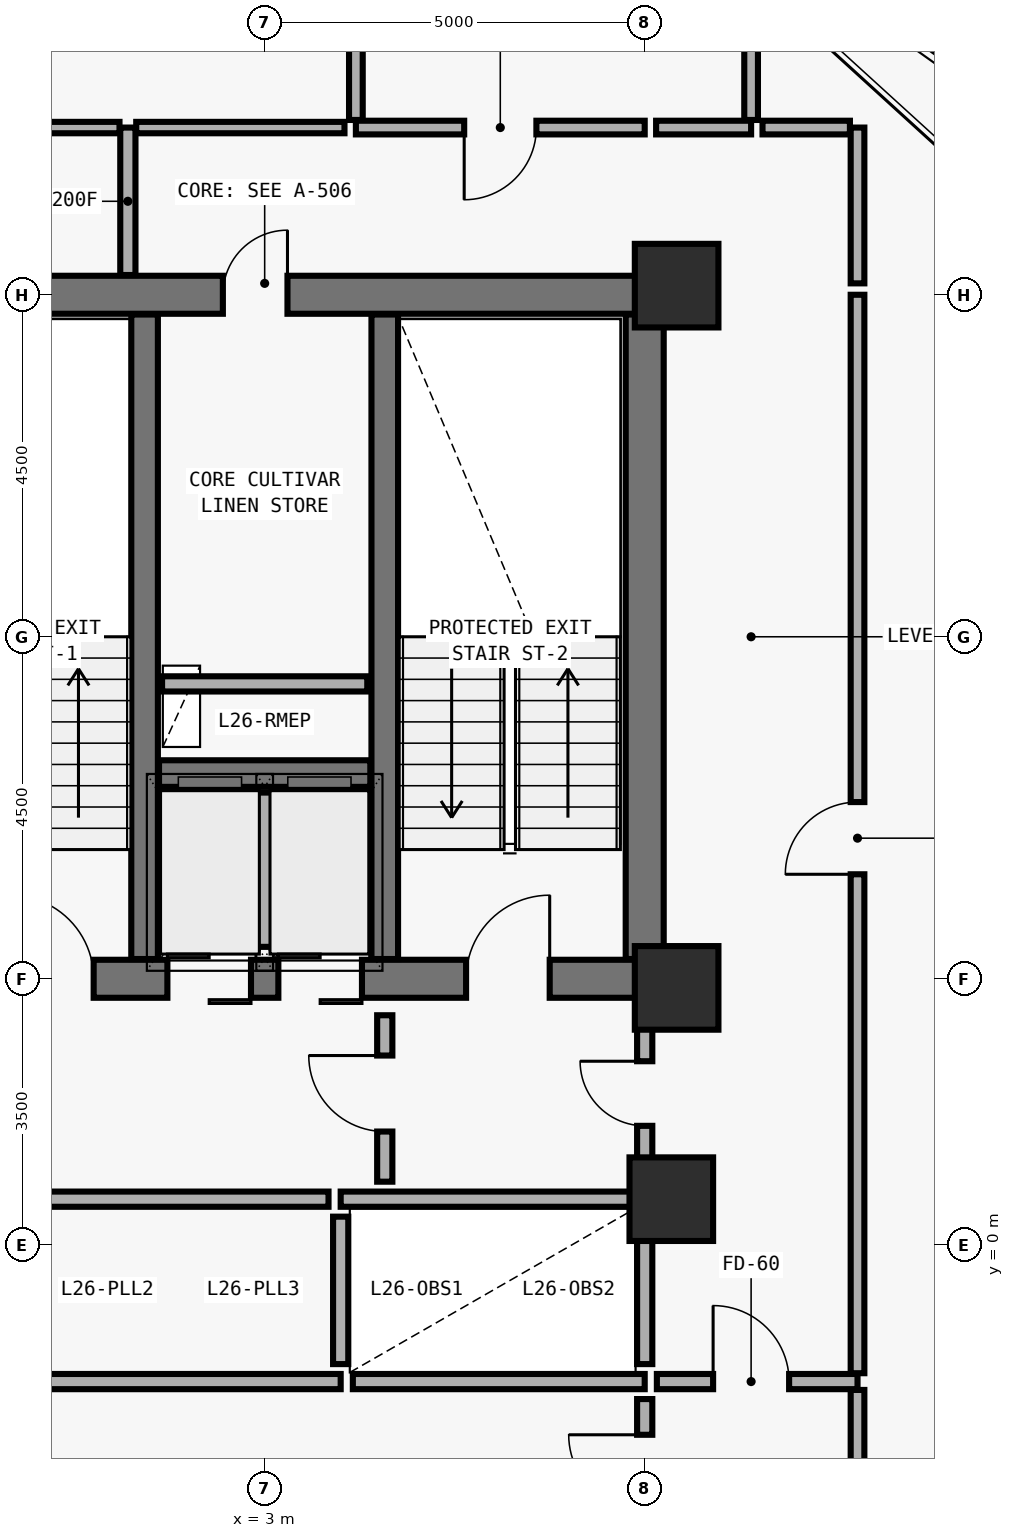
"""IFC4 building model, lengths in metres.
Left out: names, types, materials, properties, quantities, classifications, styles, units other than length and angle.
Written with IfcOpenShell. Run it as: python <this file> out.ifc"""

import sys

from ifc_helpers import new_model, si_unit, direction, frame, frame_2d, origin, origin_2d, place, context, subcontext, project, spatial, rectangle, extrude, element, fill, save


model = new_model("IFC4")
c1 = context("Model", 3, precision=1e-05, world=origin(), true_north=direction((0.0, 1.0)))
c2 = subcontext(c1, "Body", "Model", "MODEL_VIEW")
j1 = project(units=[si_unit("LENGTHUNIT", "METRE"), si_unit("PLANEANGLEUNIT", "RADIAN")], contexts=[c1])
p1 = place(None, origin())
s1 = spatial("IfcSite", under=j1, at=p1, CompositionType="ELEMENT")
p2 = place(p1, origin())
s2 = spatial("IfcBuilding", under=s1, at=p2, CompositionType="ELEMENT")
p3 = place(p2, frame((0.0, 0.0, 107.1)))
s3 = spatial("IfcBuildingStorey", under=s2, at=p3, CompositionType="ELEMENT", Elevation=107.1)
p4 = place(p3, frame((-2.0, 3.5, 0.0), z_axis=(0.0, 0.0, 1.0), x_axis=(1.0, 0.0, 0.0)))
e1 = element("IfcWall", 1, at=p4, inside=s3, PredefinedType="SHEAR", context=c2, shape_type="SweptSolid", body=[
    extrude(rectangle(XDim=10.0, YDim=0.5, at=frame_2d((5.0, 0.0))), origin(), (0.0, 0.0, 1.0), 3.892),
])
p5 = place(p4, frame((1.65, 0.0, 0.0)))
e2 = element("IfcOpeningElement", 2, at=p5, cuts=e1, PredefinedType="OPENING", context=c2, shape_type="SweptSolid", body=[
    extrude(rectangle(XDim=1.1, YDim=2.15, at=frame_2d((0.55, 1.075))), frame((0.0, 0.26, 0.0), z_axis=(0.0, -1.0, 0.0), x_axis=(1.0, 0.0, 0.0)), (0.0, 0.0, 1.0), 0.52),
])
p6 = place(p4, frame((7.65, 0.0, 0.0)))
e3 = element("IfcOpeningElement", 3, at=p6, cuts=e1, PredefinedType="OPENING", context=c2, shape_type="SweptSolid", body=[
    extrude(rectangle(XDim=1.1, YDim=2.15, at=frame_2d((0.55, 1.075))), frame((0.0, 0.26, 0.0), z_axis=(0.0, -1.0, 0.0), x_axis=(1.0, 0.0, 0.0)), (0.0, 0.0, 1.0), 0.52),
])
p7 = place(p4, frame((3.72, 0.0, 0.0)))
e4 = element("IfcOpeningElement", 4, at=p7, cuts=e1, PredefinedType="OPENING", context=c2, shape_type="SweptSolid", body=[
    extrude(rectangle(XDim=1.1, YDim=2.2, at=frame_2d((0.55, 1.1))), frame((0.0, 0.26, 0.0), z_axis=(0.0, -1.0, 0.0), x_axis=(1.0, 0.0, 0.0)), (0.0, 0.0, 1.0), 0.52),
])
p8 = place(p4, frame((5.18, 0.0, 0.0)))
e5 = element("IfcOpeningElement", 5, at=p8, cuts=e1, PredefinedType="OPENING", context=c2, shape_type="SweptSolid", body=[
    extrude(rectangle(XDim=1.1, YDim=2.2, at=frame_2d((0.55, 1.1))), frame((0.0, 0.26, 0.0), z_axis=(0.0, -1.0, 0.0), x_axis=(1.0, 0.0, 0.0)), (0.0, 0.0, 1.0), 0.52),
])
p9 = place(p3, frame((-2.0, 12.5, 0.0), z_axis=(0.0, 0.0, 1.0), x_axis=(1.0, 0.0, 0.0)))
e6 = element("IfcWall", 6, at=p9, inside=s3, PredefinedType="SHEAR", context=c2, shape_type="SweptSolid", body=[
    extrude(rectangle(XDim=10.0, YDim=0.5, at=frame_2d((5.0, 0.0))), origin(), (0.0, 0.0, 1.0), 3.892),
])
p10 = place(p9, frame((4.45, 0.0, 0.0)))
e7 = element("IfcOpeningElement", 7, at=p10, cuts=e6, PredefinedType="OPENING", context=c2, shape_type="SweptSolid", body=[
    extrude(rectangle(XDim=0.85, YDim=2.1, at=frame_2d((0.425, 1.05))), frame((0.0, 0.26, 0.0), z_axis=(0.0, -1.0, 0.0), x_axis=(1.0, 0.0, 0.0)), (0.0, 0.0, 1.0), 0.52),
])
p11 = place(p3, frame((8.0, 3.76, 0.0), z_axis=(0.0, 0.0, 1.0), x_axis=(0.0, 1.0, 0.0)))
e8 = element("IfcWall", 8, at=p11, inside=s3, PredefinedType="SHEAR", context=c2, shape_type="SweptSolid", body=[
    extrude(rectangle(XDim=8.48, YDim=0.5, at=frame_2d((4.24, 0.0))), origin(), (0.0, 0.0, 1.0), 3.892),
])
for number, where, z_axis, x_axis in (
    (9, (1.42, 3.76, 0.0), (0.0, 0.0, 1.0), (0.0, 1.0, 0.0)),
    (10, (4.58, 3.76, 0.0), (0.0, 0.0, 1.0), (0.0, 1.0, 0.0)),
):
    element("IfcWall", number, at=place(p3, frame(where, z_axis=z_axis, x_axis=x_axis)), inside=s3, PredefinedType="SHEAR", context=c2, shape_type="SweptSolid", body=[
        extrude(rectangle(XDim=8.48, YDim=0.35, at=frame_2d((4.24, 0.0))), origin(), (0.0, 0.0, 1.0), 3.892),
    ])
p12 = place(p3, frame((1.61, 6.2, 0.0), z_axis=(0.0, 0.0, 1.0), x_axis=(1.0, 0.0, 0.0)))
e11 = element("IfcWall", 11, at=p12, inside=s3, PredefinedType="SHEAR", context=c2, shape_type="SweptSolid", body=[
    extrude(rectangle(XDim=2.78, YDim=0.35, at=frame_2d((1.39, 0.0))), origin(), (0.0, 0.0, 1.0), 3.892),
])
for number, where, z_axis, x_axis in (
    (12, (8.42, 12.62, 0.0), (0.0, 0.0, 1.0), (1.0, 0.0, 0.0)),
    (13, (8.42, 3.38, 0.0), (0.0, 0.0, 1.0), (1.0, 0.0, 0.0)),
    (14, (8.35, 0.6, 0.0), (0.0, 0.0, 1.0), (1.0, 0.0, 0.0)),
):
    element("IfcColumn", number, at=place(p3, frame(where, z_axis=z_axis, x_axis=x_axis)), inside=s3, PredefinedType="COLUMN", context=c2, shape_type="SweptSolid", body=[
        extrude(rectangle(XDim=1.1, YDim=1.1, at=origin_2d()), origin(), (0.0, 0.0, 1.0), 3.875),
    ])
p13 = place(p3, frame((3.0, 3.92, 0.0), z_axis=(0.0, 0.0, 1.0), x_axis=(0.0, 1.0, 0.0)))
e15 = element("IfcWall", 15, at=p13, inside=s3, PredefinedType="SOLIDWALL", context=c2, shape_type="SweptSolid", body=[
    extrude(rectangle(XDim=2.03, YDim=0.2, at=frame_2d((1.015, 0.0))), origin(), (0.0, 0.0, 1.0), 3.64),
])
p14 = place(p3, frame((1.65, 7.38, 0.0), z_axis=(0.0, 0.0, 1.0), x_axis=(1.0, 0.0, 0.0)))
e16 = element("IfcWall", 16, at=p14, inside=s3, PredefinedType="SOLIDWALL", context=c2, shape_type="SweptSolid", body=[
    extrude(rectangle(XDim=2.7, YDim=0.2, at=frame_2d((1.35, 0.0))), origin(), (0.0, 0.0, 1.0), 3.64),
])
p15 = place(p3, frame((4.0, 0.6, 0.0), z_axis=(0.0, 0.0, 1.0), x_axis=(1.0, 0.0, 0.0)))
e17 = element("IfcWall", 17, at=p15, inside=s3, PredefinedType="SOLIDWALL", context=c2, shape_type="SweptSolid", body=[
    extrude(rectangle(XDim=3.88, YDim=0.2, at=frame_2d((1.94, 0.0))), origin(), (0.0, 0.0, 1.0), 3.172),
])
p16 = place(p3, frame((-2.0, -1.8, 0.0), z_axis=(0.0, 0.0, 1.0), x_axis=(1.0, 0.0, 0.0)))
e18 = element("IfcWall", 18, at=p16, inside=s3, PredefinedType="SOLIDWALL", context=c2, shape_type="SweptSolid", body=[
    extrude(rectangle(XDim=6.0, YDim=0.2, at=frame_2d((3.0, 0.0))), origin(), (0.0, 0.0, 1.0), 3.64),
])
p17 = place(p3, frame((4.16, -1.8, 0.0), z_axis=(0.0, 0.0, 1.0), x_axis=(1.0, 0.0, 0.0)))
e19 = element("IfcWall", 19, at=p17, inside=s3, PredefinedType="SOLIDWALL", context=c2, shape_type="SweptSolid", body=[
    extrude(rectangle(XDim=3.84, YDim=0.2, at=frame_2d((1.92, 0.0))), origin(), (0.0, 0.0, 1.0), 3.64),
])
p18 = place(p3, frame((4.0, -1.57, 0.0), z_axis=(0.0, 0.0, 1.0), x_axis=(0.0, 1.0, 0.0)))
e20 = element("IfcWall", 20, at=p18, inside=s3, PredefinedType="SOLIDWALL", context=c2, shape_type="SweptSolid", body=[
    extrude(rectangle(XDim=1.94, YDim=0.2, at=frame_2d((0.97, 0.0))), origin(), (0.0, 0.0, 1.0), 3.64),
])
p19 = place(p3, frame((8.0, -1.57, 0.0), z_axis=(0.0, 0.0, 1.0), x_axis=(0.0, 1.0, 0.0)))
e21 = element("IfcWall", 21, at=p19, inside=s3, PredefinedType="SOLIDWALL", context=c2, shape_type="SweptSolid", body=[
    extrude(rectangle(XDim=2.05, YDim=0.2, at=frame_2d((1.025, 0.0))), origin(), (0.0, 0.0, 1.0), 3.072),
])
p20 = place(p3, frame((4.58, 0.83, 0.0), z_axis=(0.0, 0.0, 1.0), x_axis=(0.0, 1.0, 0.0)))
e22 = element("IfcWall", 22, at=p20, inside=s3, PredefinedType="MOVABLE", context=c2, shape_type="SweptSolid", body=[
    extrude(rectangle(XDim=2.19, YDim=0.2, at=frame_2d((1.095, 0.0))), origin(), (0.0, 0.0, 1.0), 3.64),
])
p21 = place(p20, frame((0.66, 0.0, 0.0)))
e23 = element("IfcOpeningElement", 23, at=p21, cuts=e22, PredefinedType="OPENING", context=c2, shape_type="SweptSolid", body=[
    extrude(rectangle(XDim=1.0, YDim=2.1, at=frame_2d((0.5, 1.05))), frame((0.0, 0.11, 0.0), z_axis=(0.0, -1.0, 0.0), x_axis=(1.0, 0.0, 0.0)), (0.0, 0.0, 1.0), 0.22),
])
p22 = place(p3, frame((8.0, 0.72, 0.0), z_axis=(0.0, 0.0, 1.0), x_axis=(0.0, 1.0, 0.0)))
e24 = element("IfcWall", 24, at=p22, inside=s3, PredefinedType="MOVABLE", context=c2, shape_type="SweptSolid", body=[
    extrude(rectangle(XDim=2.3, YDim=0.2, at=frame_2d((1.15, 0.0))), origin(), (0.0, 0.0, 1.0), 2.872),
])
p23 = place(p22, frame((0.845, 0.0, 0.0)))
e25 = element("IfcOpeningElement", 25, at=p23, cuts=e24, PredefinedType="OPENING", context=c2, shape_type="SweptSolid", body=[
    extrude(rectangle(XDim=0.85, YDim=2.1, at=frame_2d((0.425, 1.05))), frame((0.0, 0.11, 0.0), z_axis=(0.0, -1.0, 0.0), x_axis=(1.0, 0.0, 0.0)), (0.0, 0.0, 1.0), 0.22),
])
p24 = place(p3, frame((8.0, -3.97, 0.0), z_axis=(0.0, 0.0, 1.0), x_axis=(0.0, 1.0, 0.0)))
e26 = element("IfcWall", 26, at=p24, inside=s3, PredefinedType="MOVABLE", context=c2, shape_type="SweptSolid", body=[
    extrude(rectangle(XDim=1.94, YDim=0.2, at=frame_2d((0.97, 0.0))), origin(), (0.0, 0.0, 1.0), 3.072),
])
p25 = place(p24, frame((0.47, 0.0, 0.0)))
e27 = element("IfcOpeningElement", 27, at=p25, cuts=e26, PredefinedType="OPENING", context=c2, shape_type="SweptSolid", body=[
    extrude(rectangle(XDim=1.0, YDim=2.1, at=frame_2d((0.5, 1.05))), frame((0.0, 0.11, 0.0), z_axis=(0.0, -1.0, 0.0), x_axis=(1.0, 0.0, 0.0)), (0.0, 0.0, 1.0), 0.22),
])
p26 = place(p3, frame((8.16, -1.8, 0.0), z_axis=(0.0, 0.0, 1.0), x_axis=(1.0, 0.0, 0.0)))
e28 = element("IfcWall", 28, at=p26, inside=s3, PredefinedType="MOVABLE", context=c2, shape_type="SweptSolid", body=[
    extrude(rectangle(XDim=2.64, YDim=0.2, at=frame_2d((1.32, 0.0))), origin(), (0.0, 0.0, 1.0), 3.64),
])
p27 = place(p26, frame((0.74, 0.0, 0.0)))
e29 = element("IfcOpeningElement", 29, at=p27, cuts=e28, PredefinedType="OPENING", context=c2, shape_type="SweptSolid", body=[
    extrude(rectangle(XDim=1.0, YDim=2.1, at=frame_2d((0.5, 1.05))), frame((0.0, 0.11, 0.0), z_axis=(0.0, -1.0, 0.0), x_axis=(1.0, 0.0, 0.0)), (0.0, 0.0, 1.0), 0.22),
])
p28 = place(p3, frame((8.0, 14.7, 0.0), z_axis=(0.0, 0.0, 1.0), x_axis=(-1.0, 0.0, 0.0)))
e30 = element("IfcWall", 30, at=p28, inside=s3, PredefinedType="PLUMBINGWALL", context=c2, shape_type="SweptSolid", body=[
    extrude(rectangle(XDim=3.8, YDim=0.18, at=frame_2d((1.9, 0.0))), origin(), (0.0, 0.0, 1.0), 3.172),
])
p29 = place(p28, frame((1.425, 0.0, 0.0)))
e31 = element("IfcOpeningElement", 31, at=p29, cuts=e30, PredefinedType="OPENING", context=c2, shape_type="SweptSolid", body=[
    extrude(rectangle(XDim=0.95, YDim=2.1, at=frame_2d((0.475, 1.05))), frame((0.0, 0.1, 0.0), z_axis=(0.0, -1.0, 0.0), x_axis=(1.0, 0.0, 0.0)), (0.0, 0.0, 1.0), 0.2),
])
p30 = place(p3, frame((10.8, -1.69, 0.0), z_axis=(0.0, 0.0, 1.0), x_axis=(0.0, 1.0, 0.0)))
e32 = element("IfcWall", 32, at=p30, inside=s3, PredefinedType="PLUMBINGWALL", context=c2, shape_type="SweptSolid", body=[
    extrude(rectangle(XDim=14.19, YDim=0.18, at=frame_2d((7.095, 0.0))), origin(), (0.0, 0.0, 1.0), 3.64),
])
p31 = place(p30, frame((6.565, 0.0, 0.0)))
e33 = element("IfcOpeningElement", 33, at=p31, cuts=e32, PredefinedType="OPENING", context=c2, shape_type="SweptSolid", body=[
    extrude(rectangle(XDim=0.95, YDim=2.1, at=frame_2d((0.475, 1.05))), frame((0.0, 0.1, 0.0), z_axis=(0.0, -1.0, 0.0), x_axis=(1.0, 0.0, 0.0)), (0.0, 0.0, 1.0), 0.2),
])
p32 = place(p3, frame((-1.88, 0.6, 0.0), z_axis=(0.0, 0.0, 1.0), x_axis=(1.0, 0.0, 0.0)))
e34 = element("IfcWall", 34, at=p32, inside=s3, PredefinedType="MOVABLE", context=c2, shape_type="SweptSolid", body=[
    extrude(rectangle(XDim=5.72, YDim=0.2, at=frame_2d((2.86, 0.0))), origin(), (0.0, 0.0, 1.0), 3.172),
])
p33 = place(p3, frame((1.2, 14.7, 0.0), z_axis=(0.0, 0.0, 1.0), x_axis=(0.0, -1.0, 0.0)))
e35 = element("IfcWall", 35, at=p33, inside=s3, PredefinedType="MOVABLE", context=c2, shape_type="SweptSolid", body=[
    extrude(rectangle(XDim=1.94, YDim=0.2, at=frame_2d((0.97, 0.0))), origin(), (0.0, 0.0, 1.0), 3.64),
])
p34 = place(p3, frame((9.4, 14.7, 0.0), z_axis=(0.0, 0.0, 1.0), x_axis=(-1.0, 0.0, 0.0)))
e36 = element("IfcWall", 36, at=p34, inside=s3, PredefinedType="PLUMBINGWALL", context=c2, shape_type="SweptSolid", body=[
    extrude(rectangle(XDim=1.25, YDim=0.18, at=frame_2d((0.625, 0.0))), origin(), (0.0, 0.0, 1.0), 3.172),
])
p35 = place(p3, frame((1.09, 14.7, 0.0), z_axis=(0.0, 0.0, 1.0), x_axis=(-1.0, 0.0, 0.0)))
e37 = element("IfcWall", 37, at=p35, inside=s3, PredefinedType="PARTITIONING", context=c2, shape_type="SweptSolid", body=[
    extrude(rectangle(XDim=3.09, YDim=0.15, at=frame_2d((1.545, 0.0))), origin(), (0.0, 0.0, 1.0), 3.64),
])
p36 = place(p3, frame((4.05, 14.7, 0.0), z_axis=(0.0, 0.0, 1.0), x_axis=(-1.0, 0.0, 0.0)))
e38 = element("IfcWall", 38, at=p36, inside=s3, PredefinedType="PARTITIONING", context=c2, shape_type="SweptSolid", body=[
    extrude(rectangle(XDim=2.74, YDim=0.15, at=frame_2d((1.37, 0.0))), origin(), (0.0, 0.0, 1.0), 3.172),
])
p37 = place(p3, frame((4.2, 19.175, 0.0), z_axis=(0.0, 0.0, 1.0), x_axis=(0.0, -1.0, 0.0)))
e39 = element("IfcWall", 39, at=p37, inside=s3, PredefinedType="PLUMBINGWALL", context=c2, shape_type="SweptSolid", body=[
    extrude(rectangle(XDim=4.375, YDim=0.18, at=frame_2d((2.188, 0.0))), origin(), (0.0, 0.0, 1.0), 3.64),
])
p38 = place(p3, frame((10.8, 12.65, 0.0), z_axis=(0.0, 0.0, 1.0), x_axis=(0.0, 1.0, 0.0)))
e40 = element("IfcWall", 40, at=p38, inside=s3, PredefinedType="PLUMBINGWALL", context=c2, shape_type="SweptSolid", body=[
    extrude(rectangle(XDim=2.05, YDim=0.18, at=frame_2d((1.025, 0.0))), origin(), (0.0, 0.0, 1.0), 3.64),
])
p39 = place(p3, frame((10.7, 14.7, 0.0), z_axis=(0.0, 0.0, 1.0), x_axis=(-1.0, 0.0, 0.0)))
e41 = element("IfcWall", 41, at=p39, inside=s3, PredefinedType="PLUMBINGWALL", context=c2, shape_type="SweptSolid", body=[
    extrude(rectangle(XDim=1.15, YDim=0.18, at=frame_2d((0.575, 0.0))), origin(), (0.0, 0.0, 1.0), 3.64),
])
p40 = place(p3, frame((10.8, -6.45, 0.0), z_axis=(0.0, 0.0, 1.0), x_axis=(0.0, 1.0, 0.0)))
e42 = element("IfcWall", 42, at=p40, inside=s3, PredefinedType="PLUMBINGWALL", context=c2, shape_type="SweptSolid", body=[
    extrude(rectangle(XDim=4.54, YDim=0.18, at=frame_2d((2.27, 0.0))), origin(), (0.0, 0.0, 1.0), 3.64),
])
p41 = place(p3, frame((9.4, 14.8, 0.0), z_axis=(0.0, 0.0, 1.0), x_axis=(0.0, 1.0, 0.0)))
e43 = element("IfcWall", 43, at=p41, inside=s3, PredefinedType="PLUMBINGWALL", context=c2, shape_type="SweptSolid", body=[
    extrude(rectangle(XDim=2.298, YDim=0.18, at=frame_2d((1.149, 0.0))), origin(), (0.0, 0.0, 1.0), 3.022),
])
p42 = place(p5, origin())
e44 = element("IfcDoor", 44, at=p42, inside=s3, OperationType="SINGLE_SWING_LEFT", PredefinedType="DOOR", context=c2, shape_type="SweptSolid", body=[
    extrude(rectangle(XDim=1.1, YDim=2.15, at=frame_2d((0.55, 1.075))), frame((0.0, 0.025, 0.0), z_axis=(0.0, -1.0, 0.0), x_axis=(1.0, 0.0, 0.0)), (0.0, 0.0, 1.0), 0.05),
])
fill(e2, e44)
p43 = place(p6, origin())
e45 = element("IfcDoor", 45, at=p43, inside=s3, OperationType="SINGLE_SWING_RIGHT", PredefinedType="DOOR", context=c2, shape_type="SweptSolid", body=[
    extrude(rectangle(XDim=1.1, YDim=2.15, at=frame_2d((0.55, 1.075))), frame((0.0, 0.025, 0.0), z_axis=(0.0, -1.0, 0.0), x_axis=(1.0, 0.0, 0.0)), (0.0, 0.0, 1.0), 0.05),
])
fill(e3, e45)
p44 = place(p7, origin())
e46 = element("IfcDoor", 46, at=p44, inside=s3, OperationType="DOUBLE_DOOR_SLIDING", PredefinedType="DOOR", context=c2, shape_type="SweptSolid", body=[
    extrude(rectangle(XDim=1.1, YDim=2.2, at=frame_2d((0.55, 1.1))), frame((0.0, 0.025, 0.0), z_axis=(0.0, -1.0, 0.0), x_axis=(1.0, 0.0, 0.0)), (0.0, 0.0, 1.0), 0.05),
])
fill(e4, e46)
p45 = place(p8, origin())
e47 = element("IfcDoor", 47, at=p45, inside=s3, OperationType="DOUBLE_DOOR_SLIDING", PredefinedType="DOOR", context=c2, shape_type="SweptSolid", body=[
    extrude(rectangle(XDim=1.1, YDim=2.2, at=frame_2d((0.55, 1.1))), frame((0.0, 0.025, 0.0), z_axis=(0.0, -1.0, 0.0), x_axis=(1.0, 0.0, 0.0)), (0.0, 0.0, 1.0), 0.05),
])
fill(e5, e47)
p46 = place(p10, origin())
e48 = element("IfcDoor", 48, at=p46, inside=s3, OperationType="SINGLE_SWING_RIGHT", PredefinedType="DOOR", context=c2, shape_type="SweptSolid", body=[
    extrude(rectangle(XDim=0.85, YDim=2.1, at=frame_2d((0.425, 1.05))), frame((0.0, 0.025, 0.0), z_axis=(0.0, -1.0, 0.0), x_axis=(1.0, 0.0, 0.0)), (0.0, 0.0, 1.0), 0.05),
])
fill(e7, e48)
p47 = place(p21, origin())
e49 = element("IfcDoor", 49, at=p47, inside=s3, OperationType="SINGLE_SWING_RIGHT", PredefinedType="DOOR", context=c2, shape_type="SweptSolid", body=[
    extrude(rectangle(XDim=1.0, YDim=2.1, at=frame_2d((0.5, 1.05))), frame((0.0, 0.025, 0.0), z_axis=(0.0, -1.0, 0.0), x_axis=(1.0, 0.0, 0.0)), (0.0, 0.0, 1.0), 0.05),
])
fill(e23, e49)
p48 = place(p23, origin())
e50 = element("IfcDoor", 50, at=p48, inside=s3, OperationType="SINGLE_SWING_RIGHT", PredefinedType="DOOR", context=c2, shape_type="SweptSolid", body=[
    extrude(rectangle(XDim=0.85, YDim=2.1, at=frame_2d((0.425, 1.05))), frame((0.0, 0.025, 0.0), z_axis=(0.0, -1.0, 0.0), x_axis=(1.0, 0.0, 0.0)), (0.0, 0.0, 1.0), 0.05),
])
fill(e25, e50)
p49 = place(p25, origin())
e51 = element("IfcDoor", 51, at=p49, inside=s3, OperationType="SINGLE_SWING_RIGHT", PredefinedType="DOOR", context=c2, shape_type="SweptSolid", body=[
    extrude(rectangle(XDim=1.0, YDim=2.1, at=frame_2d((0.5, 1.05))), frame((0.0, 0.025, 0.0), z_axis=(0.0, -1.0, 0.0), x_axis=(1.0, 0.0, 0.0)), (0.0, 0.0, 1.0), 0.05),
])
fill(e27, e51)
p50 = place(p27, origin())
e52 = element("IfcDoor", 52, at=p50, inside=s3, OperationType="SINGLE_SWING_LEFT", PredefinedType="DOOR", context=c2, shape_type="SweptSolid", body=[
    extrude(rectangle(XDim=1.0, YDim=2.1, at=frame_2d((0.5, 1.05))), frame((0.0, 0.025, 0.0), z_axis=(0.0, -1.0, 0.0), x_axis=(1.0, 0.0, 0.0)), (0.0, 0.0, 1.0), 0.05),
])
fill(e29, e52)
p51 = place(p29, origin())
e53 = element("IfcDoor", 53, at=p51, inside=s3, OperationType="SINGLE_SWING_RIGHT", PredefinedType="DOOR", context=c2, shape_type="SweptSolid", body=[
    extrude(rectangle(XDim=0.95, YDim=2.1, at=frame_2d((0.475, 1.05))), frame((0.0, 0.025, 0.0), z_axis=(0.0, -1.0, 0.0), x_axis=(1.0, 0.0, 0.0)), (0.0, 0.0, 1.0), 0.05),
])
fill(e31, e53)
p52 = place(p31, origin())
e54 = element("IfcDoor", 54, at=p52, inside=s3, OperationType="SINGLE_SWING_LEFT", PredefinedType="DOOR", context=c2, shape_type="SweptSolid", body=[
    extrude(rectangle(XDim=0.95, YDim=2.1, at=frame_2d((0.475, 1.05))), frame((0.0, 0.025, 0.0), z_axis=(0.0, -1.0, 0.0), x_axis=(1.0, 0.0, 0.0)), (0.0, 0.0, 1.0), 0.05),
])
fill(e33, e54)
save(model, sys.argv[1])
